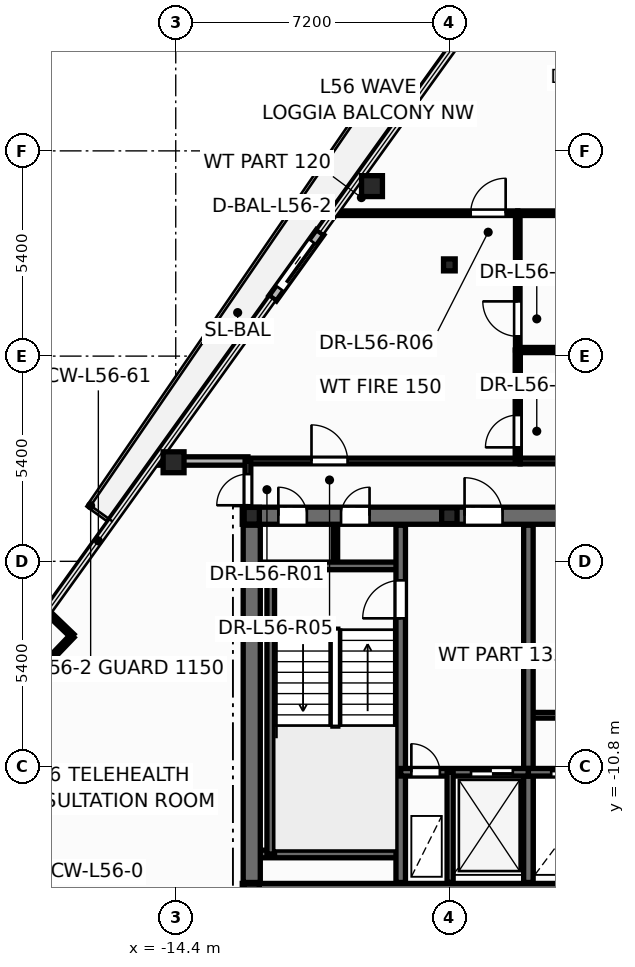
"""IFC4 building model, lengths in metres.
Left out: names, types, materials, properties, quantities, classifications, styles, units other than length and angle.
Written with IfcOpenShell. Run it as: python <this file> out.ifc"""

import sys

from ifc_helpers import new_model, si_unit, direction, frame, frame_2d, origin, origin_2d, place, context, subcontext, project, spatial, rectangle, hollow_circle, i_section, extrude, element, fill, save


model = new_model("IFC4")
c1 = context("Model", 3, precision=1e-05, world=origin(), true_north=direction((0.0, 1.0)))
c2 = subcontext(c1, "Body", "Model", "MODEL_VIEW")
j1 = project(units=[si_unit("LENGTHUNIT", "METRE"), si_unit("PLANEANGLEUNIT", "RADIAN")], contexts=[c1])
p1 = place(None, origin())
s1 = spatial("IfcSite", under=j1, at=p1, CompositionType="ELEMENT")
p2 = place(p1, origin())
s2 = spatial("IfcBuilding", under=s1, at=p2, CompositionType="ELEMENT")
p3 = place(p2, frame((0.0, 0.0, 214.5)))
s3 = spatial("IfcBuildingStorey", under=s2, at=p3, CompositionType="ELEMENT", Elevation=214.5)
for number, where, z_axis, x_axis in (
    (1, (-9.236, 4.473, 0.0), (0.0, 0.0, 1.0), (1.0, 0.0, 0.0)),
    (2, (-14.457, -2.793, 0.0), (0.0, 0.0, 1.0), (1.0, 0.0, 0.0)),
):
    element("IfcColumn", number, at=place(p3, frame(where, z_axis=z_axis, x_axis=x_axis)), inside=s3, PredefinedType="COLUMN", context=c2, shape_type="SweptSolid", body=[
        extrude(hollow_circle(Radius=0.275, WallThickness=0.024, at=origin_2d()), origin(), (0.0, 0.0, 1.0), 3.6),
    ])
for number, where, z_axis, x_axis in (
    (3, (-12.4, -14.1, 0.0), (0.0, 0.0, 1.0), (1.0, 0.0, 0.0)),
    (4, (-12.4, -4.2, 0.0), (0.0, 0.0, 1.0), (1.0, 0.0, 0.0)),
):
    element("IfcColumn", number, at=place(p3, frame(where, z_axis=z_axis, x_axis=x_axis)), inside=s3, PredefinedType="COLUMN", context=c2, shape_type="SweptSolid", body=[
        extrude(i_section(OverallWidth=0.4, OverallDepth=0.44, WebThickness=0.028, FlangeThickness=0.04, at=origin_2d()), origin(), (0.0, 0.0, 1.0), 3.6),
    ])
p4 = place(p3, frame((-7.2, -4.2, 0.0), z_axis=(0.0, 0.0, 1.0), x_axis=(1.0, 0.0, 0.0)))
e5 = element("IfcColumn", 5, at=p4, inside=s3, PredefinedType="PILASTER", context=c2, shape_type="SweptSolid", body=[
    extrude(i_section(OverallWidth=0.405, OverallDepth=0.414, WebThickness=0.022, FlangeThickness=0.032, at=origin_2d()), origin(), (0.0, 0.0, 1.0), 3.6),
])
p5 = place(p3, frame((-7.2, 2.4, 0.0), z_axis=(0.0, 0.0, 1.0), x_axis=(1.0, 0.0, 0.0)))
e6 = element("IfcColumn", 6, at=p5, inside=s3, PredefinedType="COLUMN", context=c2, shape_type="SweptSolid", body=[
    extrude(i_section(OverallWidth=0.307, OverallDepth=0.314, WebThickness=0.012, FlangeThickness=0.019, at=origin_2d()), origin(), (0.0, 0.0, 1.0), 3.6),
])
p6 = place(p3, frame((-10.601, 3.259, -0.015), z_axis=(0.0, 0.0, 1.0), x_axis=(-0.583556118157, -0.812072815061, 0.0)))
e7 = element("IfcWall", 7, at=p6, inside=s3, PredefinedType="STANDARD", context=c2, shape_type="SweptSolid", body=[
    extrude(rectangle(XDim=2.14, YDim=0.24, at=frame_2d((1.07, 0.0))), origin(), (0.0, 0.0, 1.0), 2.802),
])
p7 = place(p6, frame((0.32, 0.0, 0.015)))
e8 = element("IfcOpeningElement", 8, at=p7, cuts=e7, PredefinedType="OPENING", context=c2, shape_type="SweptSolid", body=[
    extrude(rectangle(XDim=1.506, YDim=2.204, at=frame_2d((0.75, 1.102))), frame((0.0, 0.13, 0.0), z_axis=(0.0, -1.0, 0.0), x_axis=(1.0, 0.0, 0.0)), (0.0, 0.0, 1.0), 0.26),
])
p8 = place(p3, frame((-5.12, -9.45, 0.0), z_axis=(0.0, 0.0, 1.0), x_axis=(1.0, 0.0, 0.0)))
e9 = element("IfcWall", 9, at=p8, inside=s3, PredefinedType="PARTITIONING", context=c2, shape_type="SweptSolid", body=[
    extrude(rectangle(XDim=3.06, YDim=0.15, at=frame_2d((1.53, 0.0))), origin(), (0.0, 0.0, 1.0), 3.345),
])
p9 = place(p3, frame((-10.2, -5.52, 0.0), z_axis=(0.0, 0.0, 1.0), x_axis=(0.0, 1.0, 0.0)))
e10 = element("IfcWall", 10, at=p9, inside=s3, PredefinedType="PARTITIONING", context=c2, shape_type="SweptSolid", body=[
    extrude(rectangle(XDim=1.12, YDim=0.12, at=frame_2d((0.56, 0.0))), origin(), (0.0, 0.0, 1.0), 3.345),
])
p10 = place(p3, frame((-12.65, -14.1, 0.0), z_axis=(0.0, 0.0, 1.0), x_axis=(1.0, 0.0, 0.0)))
e11 = element("IfcWall", 11, at=p10, inside=s3, PredefinedType="SHEAR", context=c2, shape_type="SweptSolid", body=[
    extrude(rectangle(XDim=25.3, YDim=0.45, at=frame_2d((12.65, 0.0))), origin(), (0.0, 0.0, 1.0), 3.6),
])
p11 = place(p3, frame((-12.65, -4.2, 0.0), z_axis=(0.0, 0.0, 1.0), x_axis=(1.0, 0.0, 0.0)))
e12 = element("IfcWall", 12, at=p11, inside=s3, PredefinedType="SHEAR", context=c2, shape_type="SweptSolid", body=[
    extrude(rectangle(XDim=25.3, YDim=0.45, at=frame_2d((12.65, 0.0))), origin(), (0.0, 0.0, 1.0), 3.6),
])
p12 = place(p11, frame((0.95, 0.0, 0.0)))
e13 = element("IfcOpeningElement", 13, at=p12, cuts=e12, PredefinedType="OPENING", context=c2, shape_type="SweptSolid", body=[
    extrude(rectangle(XDim=0.756, YDim=2.054, at=frame_2d((0.375, 1.027))), frame((0.0, 0.235, 0.0), z_axis=(0.0, -1.0, 0.0), x_axis=(1.0, 0.0, 0.0)), (0.0, 0.0, 1.0), 0.47),
])
p13 = place(p11, frame((2.6, 0.0, 0.0)))
e14 = element("IfcOpeningElement", 14, at=p13, cuts=e12, PredefinedType="OPENING", context=c2, shape_type="SweptSolid", body=[
    extrude(rectangle(XDim=0.756, YDim=2.054, at=frame_2d((0.375, 1.027))), frame((0.0, 0.235, 0.0), z_axis=(0.0, -1.0, 0.0), x_axis=(1.0, 0.0, 0.0)), (0.0, 0.0, 1.0), 0.47),
])
p14 = place(p11, frame((21.85, 0.0, 0.0)))
e15 = element("IfcOpeningElement", 15, at=p14, cuts=e12, PredefinedType="OPENING", context=c2, shape_type="SweptSolid", body=[
    extrude(rectangle(XDim=0.756, YDim=2.054, at=frame_2d((0.375, 1.027))), frame((0.0, 0.235, 0.0), z_axis=(0.0, -1.0, 0.0), x_axis=(1.0, 0.0, 0.0)), (0.0, 0.0, 1.0), 0.47),
])
p15 = place(p11, frame((23.5, 0.0, 0.0)))
e16 = element("IfcOpeningElement", 16, at=p15, cuts=e12, PredefinedType="OPENING", context=c2, shape_type="SweptSolid", body=[
    extrude(rectangle(XDim=0.756, YDim=2.054, at=frame_2d((0.375, 1.027))), frame((0.0, 0.235, 0.0), z_axis=(0.0, -1.0, 0.0), x_axis=(1.0, 0.0, 0.0)), (0.0, 0.0, 1.0), 0.47),
])
p16 = place(p11, frame((5.85, 0.0, 0.0)))
e17 = element("IfcOpeningElement", 17, at=p16, cuts=e12, PredefinedType="OPENING", context=c2, shape_type="SweptSolid", body=[
    extrude(rectangle(XDim=1.006, YDim=2.104, at=frame_2d((0.5, 1.052))), frame((0.0, 0.235, 0.0), z_axis=(0.0, -1.0, 0.0), x_axis=(1.0, 0.0, 0.0)), (0.0, 0.0, 1.0), 0.47),
])
p17 = place(p11, frame((10.35, 0.0, 0.0)))
e18 = element("IfcOpeningElement", 18, at=p17, cuts=e12, PredefinedType="OPENING", context=c2, shape_type="SweptSolid", body=[
    extrude(rectangle(XDim=1.406, YDim=2.154, at=frame_2d((0.7, 1.077))), frame((0.0, 0.235, 0.0), z_axis=(0.0, -1.0, 0.0), x_axis=(1.0, 0.0, 0.0)), (0.0, 0.0, 1.0), 0.47),
])
p18 = place(p11, frame((18.45, 0.0, 0.0)))
e19 = element("IfcOpeningElement", 19, at=p18, cuts=e12, PredefinedType="OPENING", context=c2, shape_type="SweptSolid", body=[
    extrude(rectangle(XDim=1.006, YDim=2.104, at=frame_2d((0.5, 1.052))), frame((0.0, 0.235, 0.0), z_axis=(0.0, -1.0, 0.0), x_axis=(1.0, 0.0, 0.0)), (0.0, 0.0, 1.0), 0.47),
])
for number, where, z_axis, x_axis in (
    (20, (-12.35, -5.52, 0.0), (0.0, 0.0, 1.0), (1.0, 0.0, 0.0)),
    (21, (-12.35, -13.1, 0.0), (0.0, 0.0, 1.0), (1.0, 0.0, 0.0)),
):
    element("IfcWall", number, at=place(p3, frame(where, z_axis=z_axis, x_axis=x_axis)), inside=s3, PredefinedType="SOLIDWALL", context=c2, shape_type="SweptSolid", body=[
        extrude(rectangle(XDim=3.87, YDim=0.2, at=frame_2d((1.935, 0.0))), origin(), (0.0, 0.0, 1.0), 3.6),
    ])
p19 = place(p3, frame((-11.9, -13.1, 0.0), z_axis=(0.0, 0.0, 1.0), x_axis=(0.0, 1.0, 0.0)))
e22 = element("IfcWall", 22, at=p19, inside=s3, PredefinedType="SOLIDWALL", context=c2, shape_type="SweptSolid", body=[
    extrude(rectangle(XDim=7.58, YDim=0.2, at=frame_2d((3.79, 0.0))), origin(), (0.0, 0.0, 1.0), 3.6),
])
p20 = place(p3, frame((-8.48, -13.85, 0.0), z_axis=(0.0, 0.0, 1.0), x_axis=(0.0, 1.0, 0.0)))
e23 = element("IfcWall", 23, at=p20, inside=s3, PredefinedType="SHEAR", context=c2, shape_type="SweptSolid", body=[
    extrude(rectangle(XDim=9.4, YDim=0.25, at=frame_2d((4.7, 0.0))), origin(), (0.0, 0.0, 1.0), 3.6),
])
p21 = place(p20, frame((6.95, 0.0, 0.0)))
e24 = element("IfcOpeningElement", 24, at=p21, cuts=e23, PredefinedType="OPENING", context=c2, shape_type="SweptSolid", body=[
    extrude(rectangle(XDim=1.006, YDim=2.104, at=frame_2d((0.5, 1.052))), frame((0.0, 0.135, 0.0), z_axis=(0.0, -1.0, 0.0), x_axis=(1.0, 0.0, 0.0)), (0.0, 0.0, 1.0), 0.27),
])
p22 = place(p3, frame((-5.12, -13.85, 0.0), z_axis=(0.0, 0.0, 1.0), x_axis=(0.0, 1.0, 0.0)))
e25 = element("IfcWall", 25, at=p22, inside=s3, PredefinedType="SHEAR", context=c2, shape_type="SweptSolid", body=[
    extrude(rectangle(XDim=9.4, YDim=0.25, at=frame_2d((4.7, 0.0))), origin(), (0.0, 0.0, 1.0), 3.6),
])
p23 = place(p3, frame((-8.48, -10.95, 0.0), z_axis=(0.0, 0.0, 1.0), x_axis=(1.0, 0.0, 0.0)))
e26 = element("IfcWall", 26, at=p23, inside=s3, PredefinedType="SOLIDWALL", context=c2, shape_type="SweptSolid", body=[
    extrude(rectangle(XDim=3.36, YDim=0.2, at=frame_2d((1.68, 0.0))), origin(), (0.0, 0.0, 1.0), 3.6),
])
p24 = place(p23, frame((0.28, 0.0, 0.0)))
e27 = element("IfcOpeningElement", 27, at=p24, cuts=e26, PredefinedType="OPENING", context=c2, shape_type="SweptSolid", body=[
    extrude(rectangle(XDim=0.756, YDim=2.054, at=frame_2d((0.375, 1.027))), frame((0.0, 0.11, 0.0), z_axis=(0.0, -1.0, 0.0), x_axis=(1.0, 0.0, 0.0)), (0.0, 0.0, 1.0), 0.22),
])
p25 = place(p23, frame((1.85, 0.0, 0.0)))
e28 = element("IfcOpeningElement", 28, at=p25, cuts=e26, PredefinedType="OPENING", context=c2, shape_type="SweptSolid", body=[
    extrude(rectangle(XDim=1.106, YDim=2.104, at=frame_2d((0.55, 1.052))), frame((0.0, 0.11, 0.0), z_axis=(0.0, -1.0, 0.0), x_axis=(1.0, 0.0, 0.0)), (0.0, 0.0, 1.0), 0.22),
])
p26 = place(p3, frame((-5.12, -10.95, 0.0), z_axis=(0.0, 0.0, 1.0), x_axis=(1.0, 0.0, 0.0)))
e29 = element("IfcWall", 29, at=p26, inside=s3, PredefinedType="SOLIDWALL", context=c2, shape_type="SweptSolid", body=[
    extrude(rectangle(XDim=10.24, YDim=0.2, at=frame_2d((5.12, 0.0))), origin(), (0.0, 0.0, 1.0), 3.6),
])
p27 = place(p26, frame((0.6, 0.0, 0.0)))
e30 = element("IfcOpeningElement", 30, at=p27, cuts=e29, PredefinedType="OPENING", context=c2, shape_type="SweptSolid", body=[
    extrude(rectangle(XDim=1.106, YDim=2.104, at=frame_2d((0.55, 1.052))), frame((0.0, 0.11, 0.0), z_axis=(0.0, -1.0, 0.0), x_axis=(1.0, 0.0, 0.0)), (0.0, 0.0, 1.0), 0.22),
])
p28 = place(p26, frame((2.67, 0.0, 0.0)))
e31 = element("IfcOpeningElement", 31, at=p28, cuts=e29, PredefinedType="OPENING", context=c2, shape_type="SweptSolid", body=[
    extrude(rectangle(XDim=1.106, YDim=2.104, at=frame_2d((0.55, 1.052))), frame((0.0, 0.11, 0.0), z_axis=(0.0, -1.0, 0.0), x_axis=(1.0, 0.0, 0.0)), (0.0, 0.0, 1.0), 0.22),
])
p29 = place(p26, frame((4.57, 0.0, 0.0)))
e32 = element("IfcOpeningElement", 32, at=p29, cuts=e29, PredefinedType="OPENING", context=c2, shape_type="SweptSolid", body=[
    extrude(rectangle(XDim=1.106, YDim=2.104, at=frame_2d((0.55, 1.052))), frame((0.0, 0.11, 0.0), z_axis=(0.0, -1.0, 0.0), x_axis=(1.0, 0.0, 0.0)), (0.0, 0.0, 1.0), 0.22),
])
p30 = place(p26, frame((6.47, 0.0, 0.0)))
e33 = element("IfcOpeningElement", 33, at=p30, cuts=e29, PredefinedType="OPENING", context=c2, shape_type="SweptSolid", body=[
    extrude(rectangle(XDim=1.106, YDim=2.104, at=frame_2d((0.55, 1.052))), frame((0.0, 0.11, 0.0), z_axis=(0.0, -1.0, 0.0), x_axis=(1.0, 0.0, 0.0)), (0.0, 0.0, 1.0), 0.22),
])
p31 = place(p26, frame((8.54, 0.0, 0.0)))
e34 = element("IfcOpeningElement", 34, at=p31, cuts=e29, PredefinedType="OPENING", context=c2, shape_type="SweptSolid", body=[
    extrude(rectangle(XDim=1.106, YDim=2.104, at=frame_2d((0.55, 1.052))), frame((0.0, 0.11, 0.0), z_axis=(0.0, -1.0, 0.0), x_axis=(1.0, 0.0, 0.0)), (0.0, 0.0, 1.0), 0.22),
])
p32 = place(p3, frame((-7.18, -13.85, 0.0), z_axis=(0.0, 0.0, 1.0), x_axis=(0.0, 1.0, 0.0)))
e35 = element("IfcWall", 35, at=p32, inside=s3, PredefinedType="PARTITIONING", context=c2, shape_type="SweptSolid", body=[
    extrude(rectangle(XDim=2.9, YDim=0.16, at=frame_2d((1.45, 0.0))), origin(), (0.0, 0.0, 1.0), 2.47),
])
p33 = place(p3, frame((-12.4, -13.85, 0.0), z_axis=(0.0, 0.0, 1.0), x_axis=(0.0, 1.0, 0.0)))
e36 = element("IfcWall", 36, at=p33, inside=s3, PredefinedType="SHEAR", context=c2, shape_type="SweptSolid", body=[
    extrude(rectangle(XDim=9.4, YDim=0.45, at=frame_2d((4.7, 0.0))), origin(), (0.0, 0.0, 1.0), 3.6),
])
p34 = place(p3, frame((-12.5, -2.76, 0.0), z_axis=(0.0, 0.0, 1.0), x_axis=(1.0, 0.0, 0.0)))
e37 = element("IfcWall", 37, at=p34, inside=s3, PredefinedType="PARTITIONING", context=c2, shape_type="SweptSolid", body=[
    extrude(rectangle(XDim=7.16, YDim=0.15, at=frame_2d((3.58, 0.0))), origin(), (0.0, 0.0, 1.0), 2.32),
])
p35 = place(p34, frame((1.672, 0.0, 0.0)))
e38 = element("IfcOpeningElement", 38, at=p35, cuts=e37, PredefinedType="OPENING", context=c2, shape_type="SweptSolid", body=[
    extrude(rectangle(XDim=0.956, YDim=2.104, at=frame_2d((0.475, 1.052))), frame((0.0, 0.085, 0.0), z_axis=(0.0, -1.0, 0.0), x_axis=(1.0, 0.0, 0.0)), (0.0, 0.0, 1.0), 0.17),
])
p36 = place(p3, frame((-10.241, 3.76, 0.0), z_axis=(0.0, 0.0, 1.0), x_axis=(1.0, 0.0, 0.0)))
e39 = element("IfcWall", 39, at=p36, inside=s3, PredefinedType="PARTITIONING", context=c2, shape_type="SweptSolid", body=[
    extrude(rectangle(XDim=4.841, YDim=0.12, at=frame_2d((2.42, 0.0))), origin(), (0.0, 0.0, 1.0), 2.32),
])
p37 = place(p36, frame((3.602, 0.0, 0.0)))
e40 = element("IfcOpeningElement", 40, at=p37, cuts=e39, PredefinedType="OPENING", context=c2, shape_type="SweptSolid", body=[
    extrude(rectangle(XDim=0.926, YDim=2.104, at=frame_2d((0.46, 1.052))), frame((0.0, 0.07, 0.0), z_axis=(0.0, -1.0, 0.0), x_axis=(1.0, 0.0, 0.0)), (0.0, 0.0, 1.0), 0.14),
])
p38 = place(p3, frame((-5.4, 0.16, 0.0), z_axis=(0.0, 0.0, 1.0), x_axis=(0.0, 1.0, 0.0)))
e41 = element("IfcWall", 41, at=p38, inside=s3, PredefinedType="PARTITIONING", context=c2, shape_type="SweptSolid", body=[
    extrude(rectangle(XDim=3.6, YDim=0.12, at=frame_2d((1.8, 0.0))), origin(), (0.0, 0.0, 1.0), 2.32),
])
p39 = place(p38, frame((0.36, 0.0, 0.0)))
e42 = element("IfcOpeningElement", 42, at=p39, cuts=e41, PredefinedType="OPENING", context=c2, shape_type="SweptSolid", body=[
    extrude(rectangle(XDim=0.926, YDim=2.104, at=frame_2d((0.46, 1.052))), frame((0.0, 0.07, 0.0), z_axis=(0.0, -1.0, 0.0), x_axis=(1.0, 0.0, 0.0)), (0.0, 0.0, 1.0), 0.14),
])
p40 = place(p3, frame((-5.4, -2.76, 0.0), z_axis=(0.0, 0.0, 1.0), x_axis=(0.0, 1.0, 0.0)))
e43 = element("IfcWall", 43, at=p40, inside=s3, PredefinedType="PARTITIONING", context=c2, shape_type="SweptSolid", body=[
    extrude(rectangle(XDim=2.92, YDim=0.135, at=frame_2d((1.46, 0.0))), origin(), (0.0, 0.0, 1.0), 3.345),
])
p41 = place(p40, frame((0.359, 0.0, 0.0)))
e44 = element("IfcOpeningElement", 44, at=p41, cuts=e43, PredefinedType="OPENING", context=c2, shape_type="SweptSolid", body=[
    extrude(rectangle(XDim=0.856, YDim=2.104, at=frame_2d((0.425, 1.052))), frame((0.0, 0.078, 0.0), z_axis=(0.0, -1.0, 0.0), x_axis=(1.0, 0.0, 0.0)), (0.0, 0.0, 1.0), 0.155),
])
p42 = place(p3, frame((-5.338, -2.76, 0.0), z_axis=(0.0, 0.0, 1.0), x_axis=(1.0, 0.0, 0.0)))
e45 = element("IfcWall", 45, at=p42, inside=s3, PredefinedType="PARTITIONING", context=c2, shape_type="SweptSolid", body=[
    extrude(rectangle(XDim=4.776, YDim=0.15, at=frame_2d((2.388, 0.0))), origin(), (0.0, 0.0, 1.0), 2.964),
])
p43 = place(p3, frame((-5.4, 0.16, 0.0), z_axis=(0.0, 0.0, 1.0), x_axis=(1.0, 0.0, 0.0)))
e46 = element("IfcWall", 46, at=p43, inside=s3, PredefinedType="PARTITIONING", context=c2, shape_type="SweptSolid", body=[
    extrude(rectangle(XDim=4.9, YDim=0.135, at=frame_2d((2.45, 0.0))), origin(), (0.0, 0.0, 1.0), 2.964),
])
p44 = place(p3, frame((-5.4, 3.76, 0.0), z_axis=(0.0, 0.0, 1.0), x_axis=(1.0, 0.0, 0.0)))
e47 = element("IfcWall", 47, at=p44, inside=s3, PredefinedType="PARTITIONING", context=c2, shape_type="SweptSolid", body=[
    extrude(rectangle(XDim=2.6, YDim=0.12, at=frame_2d((1.3, 0.0))), origin(), (0.0, 0.0, 1.0), 3.345),
])
p45 = place(p3, frame((-14.926, -2.76, 0.0), z_axis=(0.0, 0.0, 1.0), x_axis=(1.0, 0.0, 0.0)))
e48 = element("IfcWall", 48, at=p45, inside=s3, PredefinedType="PARTITIONING", context=c2, shape_type="SweptSolid", body=[
    extrude(rectangle(XDim=2.426, YDim=0.22, at=frame_2d((1.213, 0.0))), origin(), (0.0, 0.0, 1.0), 2.32),
])
p46 = place(p3, frame((-17.12, -7.362, 0.0), z_axis=(0.0, 0.0, 1.0), x_axis=(-0.691975296368, -0.721921179366, 0.0)))
e49 = element("IfcWall", 49, at=p46, inside=s3, PredefinedType="PARTITIONING", context=c2, shape_type="SweptSolid", body=[
    extrude(rectangle(XDim=2.275, YDim=0.12, at=frame_2d((1.137, 0.0))), origin(), (0.0, 0.0, 1.0), 3.345),
])
p47 = place(p3, frame((-12.5, -4.24, 0.0), z_axis=(0.0, 0.0, 1.0), x_axis=(0.0, 1.0, 0.0)))
e50 = element("IfcWall", 50, at=p47, inside=s3, PredefinedType="PARTITIONING", context=c2, shape_type="SweptSolid", body=[
    extrude(rectangle(XDim=1.48, YDim=0.15, at=frame_2d((0.74, 0.0))), origin(), (0.0, 0.0, 1.0), 2.32),
])
p48 = place(p47, frame((0.315, 0.0, 0.0)))
e51 = element("IfcOpeningElement", 51, at=p48, cuts=e50, PredefinedType="OPENING", context=c2, shape_type="SweptSolid", body=[
    extrude(rectangle(XDim=0.826, YDim=2.104, at=frame_2d((0.41, 1.052))), frame((0.0, 0.085, 0.0), z_axis=(0.0, -1.0, 0.0), x_axis=(1.0, 0.0, 0.0)), (0.0, 0.0, 1.0), 0.17),
])
p49 = place(p3, frame((-17.771, -6.737, 0.0), z_axis=(0.0, 0.0, 1.0), x_axis=(0.721695363455, -0.692210807751, 0.0)))
e52 = element("IfcWall", 52, at=p49, inside=s3, PredefinedType="PARTITIONING", context=c2, shape_type="SweptSolid", body=[
    extrude(rectangle(XDim=0.903, YDim=0.12, at=frame_2d((0.451, 0.0))), origin(), (0.0, 0.0, 1.0), 2.787),
])
p50 = place(p7, origin())
e53 = element("IfcDoor", 53, at=p50, inside=s3, OperationType="SLIDING_TO_RIGHT", PredefinedType="DOOR", context=c2, shape_type="SweptSolid", body=[
    extrude(rectangle(XDim=1.5, YDim=2.2, at=frame_2d((0.75, 1.1))), frame((0.0, 0.025, 0.0), z_axis=(0.0, -1.0, 0.0), x_axis=(1.0, 0.0, 0.0)), (0.0, 0.0, 1.0), 0.05),
])
fill(e8, e53)
p51 = place(p21, origin())
e54 = element("IfcDoor", 54, at=p51, inside=s3, OperationType="SINGLE_SWING_LEFT", PredefinedType="DOOR", context=c2, shape_type="SweptSolid", body=[
    extrude(rectangle(XDim=1.0, YDim=2.1, at=frame_2d((0.5, 1.05))), frame((0.0, 0.025, 0.0), z_axis=(0.0, -1.0, 0.0), x_axis=(1.0, 0.0, 0.0)), (0.0, 0.0, 1.0), 0.05),
])
fill(e24, e54)
p52 = place(p24, origin())
e55 = element("IfcDoor", 55, at=p52, inside=s3, OperationType="SINGLE_SWING_LEFT", PredefinedType="DOOR", context=c2, shape_type="SweptSolid", body=[
    extrude(rectangle(XDim=0.75, YDim=2.05, at=frame_2d((0.375, 1.025))), frame((0.0, 0.025, 0.0), z_axis=(0.0, -1.0, 0.0), x_axis=(1.0, 0.0, 0.0)), (0.0, 0.0, 1.0), 0.05),
])
fill(e27, e55)
p53 = place(p25, origin())
e56 = element("IfcDoor", 56, at=p53, inside=s3, OperationType="DOUBLE_DOOR_SLIDING", PredefinedType="DOOR", context=c2, shape_type="SweptSolid", body=[
    extrude(rectangle(XDim=1.1, YDim=2.1, at=frame_2d((0.55, 1.05))), frame((0.0, 0.025, 0.0), z_axis=(0.0, -1.0, 0.0), x_axis=(1.0, 0.0, 0.0)), (0.0, 0.0, 1.0), 0.05),
])
fill(e28, e56)
p54 = place(p27, origin())
e57 = element("IfcDoor", 57, at=p54, inside=s3, OperationType="DOUBLE_DOOR_SLIDING", PredefinedType="DOOR", context=c2, shape_type="SweptSolid", body=[
    extrude(rectangle(XDim=1.1, YDim=2.1, at=frame_2d((0.55, 1.05))), frame((0.0, 0.025, 0.0), z_axis=(0.0, -1.0, 0.0), x_axis=(1.0, 0.0, 0.0)), (0.0, 0.0, 1.0), 0.05),
])
fill(e30, e57)
p55 = place(p12, origin())
e58 = element("IfcDoor", 58, at=p55, inside=s3, OperationType="SINGLE_SWING_LEFT", PredefinedType="DOOR", context=c2, shape_type="SweptSolid", body=[
    extrude(rectangle(XDim=0.75, YDim=2.05, at=frame_2d((0.375, 1.025))), frame((0.0, 0.025, 0.0), z_axis=(0.0, -1.0, 0.0), x_axis=(1.0, 0.0, 0.0)), (0.0, 0.0, 1.0), 0.05),
])
fill(e13, e58)
p56 = place(p13, origin())
e59 = element("IfcDoor", 59, at=p56, inside=s3, OperationType="SINGLE_SWING_RIGHT", PredefinedType="DOOR", context=c2, shape_type="SweptSolid", body=[
    extrude(rectangle(XDim=0.75, YDim=2.05, at=frame_2d((0.375, 1.025))), frame((0.0, 0.025, 0.0), z_axis=(0.0, -1.0, 0.0), x_axis=(1.0, 0.0, 0.0)), (0.0, 0.0, 1.0), 0.05),
])
fill(e14, e59)
p57 = place(p16, origin())
e60 = element("IfcDoor", 60, at=p57, inside=s3, OperationType="SINGLE_SWING_LEFT", PredefinedType="DOOR", context=c2, shape_type="SweptSolid", body=[
    extrude(rectangle(XDim=1.0, YDim=2.1, at=frame_2d((0.5, 1.05))), frame((0.0, 0.025, 0.0), z_axis=(0.0, -1.0, 0.0), x_axis=(1.0, 0.0, 0.0)), (0.0, 0.0, 1.0), 0.05),
])
fill(e17, e60)
p58 = place(p48, origin())
e61 = element("IfcDoor", 61, at=p58, inside=s3, OperationType="SINGLE_SWING_LEFT", PredefinedType="DOOR", context=c2, shape_type="SweptSolid", body=[
    extrude(rectangle(XDim=0.82, YDim=2.1, at=frame_2d((0.41, 1.05))), frame((0.0, 0.025, 0.0), z_axis=(0.0, -1.0, 0.0), x_axis=(1.0, 0.0, 0.0)), (0.0, 0.0, 1.0), 0.05),
])
fill(e51, e61)
p59 = place(p41, origin())
e62 = element("IfcDoor", 62, at=p59, inside=s3, OperationType="SINGLE_SWING_LEFT", PredefinedType="DOOR", context=c2, shape_type="SweptSolid", body=[
    extrude(rectangle(XDim=0.85, YDim=2.1, at=frame_2d((0.425, 1.05))), frame((0.0, 0.025, 0.0), z_axis=(0.0, -1.0, 0.0), x_axis=(1.0, 0.0, 0.0)), (0.0, 0.0, 1.0), 0.05),
])
fill(e44, e62)
p60 = place(p39, origin())
e63 = element("IfcDoor", 63, at=p60, inside=s3, OperationType="SINGLE_SWING_RIGHT", PredefinedType="DOOR", context=c2, shape_type="SweptSolid", body=[
    extrude(rectangle(XDim=0.92, YDim=2.1, at=frame_2d((0.46, 1.05))), frame((0.0, 0.025, 0.0), z_axis=(0.0, -1.0, 0.0), x_axis=(1.0, 0.0, 0.0)), (0.0, 0.0, 1.0), 0.05),
])
fill(e42, e63)
p61 = place(p35, origin())
e64 = element("IfcDoor", 64, at=p61, inside=s3, OperationType="SINGLE_SWING_LEFT", PredefinedType="DOOR", context=c2, shape_type="SweptSolid", body=[
    extrude(rectangle(XDim=0.95, YDim=2.1, at=frame_2d((0.475, 1.05))), frame((0.0, 0.025, 0.0), z_axis=(0.0, -1.0, 0.0), x_axis=(1.0, 0.0, 0.0)), (0.0, 0.0, 1.0), 0.05),
])
fill(e38, e64)
p62 = place(p37, origin())
e65 = element("IfcDoor", 65, at=p62, inside=s3, OperationType="SINGLE_SWING_RIGHT", PredefinedType="DOOR", context=c2, shape_type="SweptSolid", body=[
    extrude(rectangle(XDim=0.92, YDim=2.1, at=frame_2d((0.46, 1.05))), frame((0.0, 0.025, 0.0), z_axis=(0.0, -1.0, 0.0), x_axis=(1.0, 0.0, 0.0)), (0.0, 0.0, 1.0), 0.05),
])
fill(e40, e65)
save(model, sys.argv[1])
